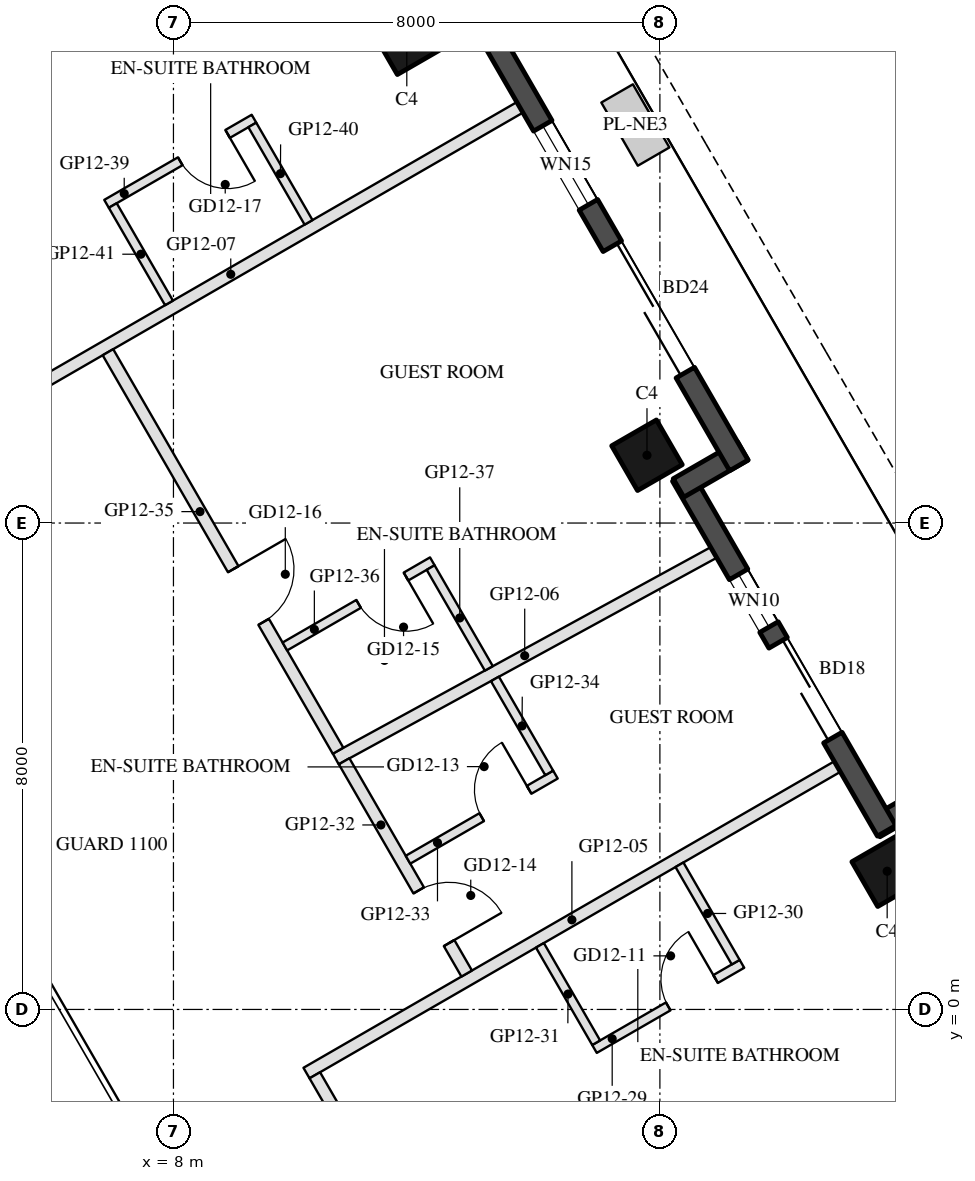
"""IFC4 building model, lengths in metres.
Left out: names, types, materials, properties, quantities, classifications, styles, units other than length and angle.
Written with IfcOpenShell. Run it as: python <this file> out.ifc"""

import sys

from ifc_helpers import new_model, si_unit, direction, frame, frame_2d, origin, origin_2d, place, context, subcontext, project, spatial, rectangle, hollow_rectangle, extrude, element, fill, save


model = new_model("IFC4")
c1 = context("Model", 3, precision=1e-05, world=origin(), true_north=direction((0.0, 1.0)))
c2 = subcontext(c1, "Body", "Model", "MODEL_VIEW")
j1 = project(units=[si_unit("LENGTHUNIT", "METRE"), si_unit("PLANEANGLEUNIT", "RADIAN")], contexts=[c1])
p1 = place(None, origin())
s1 = spatial("IfcSite", under=j1, at=p1, CompositionType="ELEMENT")
p2 = place(p1, origin())
s2 = spatial("IfcBuilding", under=s1, at=p2, CompositionType="ELEMENT")
p3 = place(p2, frame((0.0, 0.0, 146.6)))
s3 = spatial("IfcBuildingStorey", under=s2, at=p3, CompositionType="ELEMENT", Elevation=146.6)
for number, where, z_axis, x_axis in (
    (1, (19.738, 2.273, 0.0), (0.0, 0.0, 1.0), (-0.5, 0.866, 0.0)),
    (2, (15.788, 9.115, 0.0), (0.0, 0.0, 1.0), (-0.5, 0.866, 0.0)),
    (3, (11.838, 15.957, 0.0), (0.0, 0.0, 1.0), (-0.5, 0.866, 0.0)),
):
    element("IfcColumn", number, at=place(p3, frame(where, z_axis=z_axis, x_axis=x_axis)), inside=s3, PredefinedType="COLUMN", context=c2, shape_type="SweptSolid", body=[
        extrude(hollow_rectangle(XDim=0.85, YDim=0.85, WallThickness=0.04, at=origin_2d()), origin(), (0.0, 0.0, 1.0), 3.7),
    ])
p4 = place(p3, frame((20.588, 3.601, 0.0), z_axis=(0.0, 0.0, 1.0), x_axis=(-0.866005645448, -0.500034220881, 0.0)))
e4 = element("IfcWall", 4, at=p4, inside=s3, PredefinedType="SOLIDWALL", context=c2, shape_type="SweptSolid", body=[
    extrude(rectangle(XDim=1.22, YDim=0.35, at=frame_2d((0.61, 0.0))), origin(), (0.0, 0.0, 1.0), 3.55),
])
p5 = place(p3, frame((19.729, 2.938, 0.0), z_axis=(0.0, 0.0, 1.0), x_axis=(-0.499976430342, 0.866039011305, 0.0)))
e5 = element("IfcWall", 5, at=p5, inside=s3, PredefinedType="SOLIDWALL", context=c2, shape_type="SweptSolid", body=[
    extrude(rectangle(XDim=6.74, YDim=0.35, at=frame_2d((3.37, 0.0))), origin(), (0.0, 0.0, 1.0), 3.55),
])
p6 = place(p5, frame((1.77, 0.0, 0.0)))
e6 = element("IfcOpeningElement", 6, at=p6, cuts=e5, PredefinedType="OPENING", context=c2, shape_type="SweptSolid", body=[
    extrude(rectangle(XDim=1.8, YDim=2.4, at=frame_2d((0.9, 1.2))), frame((0.0, 0.185, 0.0), z_axis=(0.0, -1.0, 0.0), x_axis=(1.0, 0.0, 0.0)), (0.0, 0.0, 1.0), 0.37),
])
p7 = place(p5, frame((3.87, 0.0, 0.3)))
e7 = element("IfcOpeningElement", 7, at=p7, cuts=e5, PredefinedType="OPENING", context=c2, shape_type="SweptSolid", body=[
    extrude(rectangle(XDim=1.0, YDim=2.65, at=frame_2d((0.5, 1.325))), frame((0.0, 0.185, 0.0), z_axis=(0.0, -1.0, 0.0), x_axis=(1.0, 0.0, 0.0)), (0.0, 0.0, 1.0), 0.37),
])
p8 = place(p3, frame((16.306, 8.577, 0.0), z_axis=(0.0, 0.0, 1.0), x_axis=(0.866092288191, 0.499884134912, 0.0)))
e8 = element("IfcWall", 8, at=p8, inside=s3, PredefinedType="SOLIDWALL", context=c2, shape_type="SweptSolid", body=[
    extrude(rectangle(XDim=1.22, YDim=0.35, at=frame_2d((0.61, 0.0))), origin(), (0.0, 0.0, 1.0), 3.55),
])
p9 = place(p3, frame((17.299, 8.948, 0.0), z_axis=(0.0, 0.0, 1.0), x_axis=(-0.500010041276, 0.866019606374, 0.0)))
e9 = element("IfcWall", 9, at=p9, inside=s3, PredefinedType="SOLIDWALL", context=c2, shape_type="SweptSolid", body=[
    extrude(rectangle(XDim=9.7, YDim=0.35, at=frame_2d((4.85, 0.0))), origin(), (0.0, 0.0, 1.0), 3.55),
])
p10 = place(p9, frame((1.762, 0.0, 0.0)))
e10 = element("IfcOpeningElement", 10, at=p10, cuts=e9, PredefinedType="OPENING", context=c2, shape_type="SweptSolid", body=[
    extrude(rectangle(XDim=2.4, YDim=2.4, at=frame_2d((1.2, 1.2))), frame((0.0, 0.185, 0.0), z_axis=(0.0, -1.0, 0.0), x_axis=(1.0, 0.0, 0.0)), (0.0, 0.0, 1.0), 0.37),
])
p11 = place(p9, frame((4.949, 0.0, 0.3)))
e11 = element("IfcOpeningElement", 11, at=p11, cuts=e9, PredefinedType="OPENING", context=c2, shape_type="SweptSolid", body=[
    extrude(rectangle(XDim=1.5, YDim=2.65, at=frame_2d((0.75, 1.325))), frame((0.0, 0.185, 0.0), z_axis=(0.0, -1.0, 0.0), x_axis=(1.0, 0.0, 0.0)), (0.0, 0.0, 1.0), 0.37),
])
p12 = place(p3, frame((18.917, 3.994, 0.0), z_axis=(0.0, 0.0, 1.0), x_axis=(-0.866022637375, -0.500004791531, 0.0)))
e12 = element("IfcWall", 12, at=p12, inside=s3, PredefinedType="PARTITIONING", context=c2, shape_type="SweptSolid", body=[
    extrude(rectangle(XDim=10.08, YDim=0.2, at=frame_2d((5.04, 0.0))), origin(), (0.0, 0.0, 1.0), 3.06),
])
p13 = place(p3, frame((16.885, 7.515, 0.0), z_axis=(0.0, 0.0, 1.0), x_axis=(-0.87760821498, -0.479378577952, 0.0)))
e13 = element("IfcWall", 13, at=p13, inside=s3, PredefinedType="PARTITIONING", context=c2, shape_type="SweptSolid", body=[
    extrude(rectangle(XDim=7.082, YDim=0.2, at=frame_2d((3.541, 0.0))), origin(), (0.0, 0.0, 1.0), 3.06),
])
p14 = place(p3, frame((13.697, 14.836, 0.0), z_axis=(0.0, 0.0, 1.0), x_axis=(-0.866027479907, -0.499996404033, 0.0)))
e14 = element("IfcWall", 14, at=p14, inside=s3, PredefinedType="PARTITIONING", context=c2, shape_type="SweptSolid", body=[
    extrude(rectangle(XDim=10.98, YDim=0.2, at=frame_2d((5.49, 0.0))), origin(), (0.0, 0.0, 1.0), 3.06),
])
p15 = place(p3, frame((10.325, -1.083, 0.0), z_axis=(0.0, 0.0, 1.0), x_axis=(0.500008716408, -0.866020371305, 0.0)))
e15 = element("IfcWall", 15, at=p15, inside=s3, PredefinedType="PARTITIONING", context=c2, shape_type="SweptSolid", body=[
    extrude(rectangle(XDim=3.888, YDim=0.2, at=frame_2d((1.944, 0.0))), origin(), (0.0, 0.0, 1.0), 2.95),
])
p16 = place(p15, frame((1.444, 0.0, 0.0)))
e16 = element("IfcOpeningElement", 16, at=p16, cuts=e15, PredefinedType="OPENING", context=c2, shape_type="SweptSolid", body=[
    extrude(rectangle(XDim=1.0, YDim=2.1, at=frame_2d((0.5, 1.05))), frame((0.0, 0.11, 0.0), z_axis=(0.0, -1.0, 0.0), x_axis=(1.0, 0.0, 0.0)), (0.0, 0.0, 1.0), 0.22),
])
p17 = place(p3, frame((14.924, -0.65, 0.0), z_axis=(0.0, 0.0, 1.0), x_axis=(0.866056369097, 0.49994636267, 0.0)))
e17 = element("IfcWall", 17, at=p17, inside=s3, PredefinedType="PARTITIONING", context=c2, shape_type="SweptSolid", body=[
    extrude(rectangle(XDim=2.8, YDim=0.15, at=frame_2d((1.4, 0.0))), origin(), (0.0, 0.0, 1.0), 2.95),
])
p18 = place(p17, frame((1.4, 0.0, 0.0)))
e18 = element("IfcOpeningElement", 18, at=p18, cuts=e17, PredefinedType="OPENING", context=c2, shape_type="SweptSolid", body=[
    extrude(rectangle(XDim=0.9, YDim=2.1, at=frame_2d((0.45, 1.05))), frame((0.0, 0.085, 0.0), z_axis=(0.0, -1.0, 0.0), x_axis=(1.0, 0.0, 0.0)), (0.0, 0.0, 1.0), 0.17),
])
for number, where, z_axis, x_axis in (
    (19, (17.247, 0.778, 0.0), (0.0, 0.0, 1.0), (-0.5, 0.866, 0.0)),
    (20, (14.952, -0.547, 0.0), (0.0, 0.0, 1.0), (-0.5, 0.866, 0.0)),
):
    element("IfcWall", number, at=place(p3, frame(where, z_axis=z_axis, x_axis=x_axis)), inside=s3, PredefinedType="PARTITIONING", context=c2, shape_type="SweptSolid", body=[
        extrude(rectangle(XDim=1.85, YDim=0.15, at=frame_2d((0.925, 0.0))), origin(), (0.0, 0.0, 1.0), 2.95),
    ])
p19 = place(p3, frame((10.807, 4.082, 0.0), z_axis=(0.0, 0.0, 1.0), x_axis=(0.500040475235, -0.866002034136, 0.0)))
e21 = element("IfcWall", 21, at=p19, inside=s3, PredefinedType="PARTITIONING", context=c2, shape_type="SweptSolid", body=[
    extrude(rectangle(XDim=4.031, YDim=0.2, at=frame_2d((2.016, 0.0))), origin(), (0.0, 0.0, 1.0), 2.95),
])
p20 = place(p19, frame((2.452, 0.0, 0.0)))
e22 = element("IfcOpeningElement", 22, at=p20, cuts=e21, PredefinedType="OPENING", context=c2, shape_type="SweptSolid", body=[
    extrude(rectangle(XDim=1.0, YDim=2.1, at=frame_2d((0.5, 1.05))), frame((0.0, 0.11, 0.0), z_axis=(0.0, -1.0, 0.0), x_axis=(1.0, 0.0, 0.0)), (0.0, 0.0, 1.0), 0.22),
])
p21 = place(p3, frame((11.857, 2.463, 0.0), z_axis=(0.0, 0.0, 1.0), x_axis=(0.866034573852, 0.49998411664, 0.0)))
e23 = element("IfcWall", 23, at=p21, inside=s3, PredefinedType="PARTITIONING", context=c2, shape_type="SweptSolid", body=[
    extrude(rectangle(XDim=2.8, YDim=0.15, at=frame_2d((1.4, 0.0))), origin(), (0.0, 0.0, 1.0), 2.95),
])
p22 = place(p21, frame((1.4, 0.0, 0.0)))
e24 = element("IfcOpeningElement", 24, at=p22, cuts=e23, PredefinedType="OPENING", context=c2, shape_type="SweptSolid", body=[
    extrude(rectangle(XDim=0.9, YDim=2.1, at=frame_2d((0.45, 1.05))), frame((0.0, 0.085, 0.0), z_axis=(0.0, -1.0, 0.0), x_axis=(1.0, 0.0, 0.0)), (0.0, 0.0, 1.0), 0.17),
])
p23 = place(p3, frame((14.18, 3.89, 0.0), z_axis=(0.0, 0.0, 1.0), x_axis=(-0.500006500783, 0.866021650523, 0.0)))
e25 = element("IfcWall", 25, at=p23, inside=s3, PredefinedType="PARTITIONING", context=c2, shape_type="SweptSolid", body=[
    extrude(rectangle(XDim=1.786, YDim=0.15, at=frame_2d((0.893, 0.0))), origin(), (0.0, 0.0, 1.0), 3.55),
])
p24 = place(p3, frame((6.923, 10.81, 0.0), z_axis=(0.0, 0.0, 1.0), x_axis=(0.500007257026, -0.866021213898, 0.0)))
e26 = element("IfcWall", 26, at=p24, inside=s3, PredefinedType="PARTITIONING", context=c2, shape_type="SweptSolid", body=[
    extrude(rectangle(XDim=7.569, YDim=0.2, at=frame_2d((3.784, 0.0))), origin(), (0.0, 0.0, 1.0), 2.95),
])
p25 = place(p24, frame((4.121, 0.0, 0.0)))
e27 = element("IfcOpeningElement", 27, at=p25, cuts=e26, PredefinedType="OPENING", context=c2, shape_type="SweptSolid", body=[
    extrude(rectangle(XDim=1.0, YDim=2.1, at=frame_2d((0.5, 1.05))), frame((0.0, 0.11, 0.0), z_axis=(0.0, -1.0, 0.0), x_axis=(1.0, 0.0, 0.0)), (0.0, 0.0, 1.0), 0.22),
])
p26 = place(p3, frame((12.257, 7.37, 0.0), z_axis=(0.0, 0.0, 1.0), x_axis=(-0.865996816683, -0.500049511043, 0.0)))
e28 = element("IfcWall", 28, at=p26, inside=s3, PredefinedType="PARTITIONING", context=c2, shape_type="SweptSolid", body=[
    extrude(rectangle(XDim=2.8, YDim=0.15, at=frame_2d((1.4, 0.0))), origin(), (0.0, 0.0, 1.0), 3.55),
])
p27 = place(p26, frame((0.5, 0.0, 0.0)))
e29 = element("IfcOpeningElement", 29, at=p27, cuts=e28, PredefinedType="OPENING", context=c2, shape_type="SweptSolid", body=[
    extrude(rectangle(XDim=0.9, YDim=2.1, at=frame_2d((0.45, 1.05))), frame((0.0, 0.085, 0.0), z_axis=(0.0, -1.0, 0.0), x_axis=(1.0, 0.0, 0.0)), (0.0, 0.0, 1.0), 0.17),
])
p28 = place(p3, frame((13.187, 5.61, 0.0), z_axis=(0.0, 0.0, 1.0), x_axis=(-0.500020498207, 0.866013568815, 0.0)))
e30 = element("IfcWall", 30, at=p28, inside=s3, PredefinedType="PARTITIONING", context=c2, shape_type="SweptSolid", body=[
    extrude(rectangle(XDim=1.915, YDim=0.15, at=frame_2d((0.957, 0.0))), origin(), (0.0, 0.0, 1.0), 2.95),
])
p29 = place(p3, frame((9.324, 14.65, 0.0), z_axis=(0.0, 0.0, 1.0), x_axis=(-0.866034573852, -0.49998411664, 0.0)))
e31 = element("IfcWall", 31, at=p29, inside=s3, PredefinedType="PARTITIONING", context=c2, shape_type="SweptSolid", body=[
    extrude(rectangle(XDim=2.8, YDim=0.15, at=frame_2d((1.4, 0.0))), origin(), (0.0, 0.0, 1.0), 2.95),
])
p30 = place(p29, frame((0.5, 0.0, 0.0)))
e32 = element("IfcOpeningElement", 32, at=p30, cuts=e31, PredefinedType="OPENING", context=c2, shape_type="SweptSolid", body=[
    extrude(rectangle(XDim=0.9, YDim=2.1, at=frame_2d((0.45, 1.05))), frame((0.0, 0.085, 0.0), z_axis=(0.0, -1.0, 0.0), x_axis=(1.0, 0.0, 0.0)), (0.0, 0.0, 1.0), 0.17),
])
for number, where, z_axis, x_axis in (
    (33, (10.222, 12.945, 0.0), (0.0, 0.0, 1.0), (-0.5, 0.866, 0.0)),
    (34, (7.927, 11.62, 0.0), (0.0, 0.0, 1.0), (-0.5, 0.866, 0.0)),
):
    element("IfcWall", number, at=place(p3, frame(where, z_axis=z_axis, x_axis=x_axis)), inside=s3, PredefinedType="PARTITIONING", context=c2, shape_type="SweptSolid", body=[
        extrude(rectangle(XDim=1.85, YDim=0.15, at=frame_2d((0.925, 0.0))), origin(), (0.0, 0.0, 1.0), 2.95),
    ])
p31 = place(p6, frame((1.8, 0.0, 0.0), z_axis=(0.0, 0.0, 1.0), x_axis=(-1.0, 0.0, 0.0)))
e35 = element("IfcDoor", 35, at=p31, inside=s3, OperationType="SLIDING_TO_LEFT", PredefinedType="DOOR", context=c2, shape_type="SweptSolid", body=[
    extrude(rectangle(XDim=1.8, YDim=2.4, at=frame_2d((0.9, 1.2))), frame((0.0, 0.025, 0.0), z_axis=(0.0, -1.0, 0.0), x_axis=(1.0, 0.0, 0.0)), (0.0, 0.0, 1.0), 0.05),
])
fill(e6, e35)
p32 = place(p7, origin())
e36 = element("IfcWindow", 36, at=p32, inside=s3, PartitioningType="SINGLE_PANEL", PredefinedType="WINDOW", context=c2, shape_type="SweptSolid", body=[
    extrude(rectangle(XDim=1.0, YDim=2.65, at=frame_2d((0.5, 1.325))), frame((0.0, 0.03, 0.0), z_axis=(0.0, -1.0, 0.0), x_axis=(1.0, 0.0, 0.0)), (0.0, 0.0, 1.0), 0.06),
])
fill(e7, e36)
p33 = place(p10, frame((2.4, 0.0, 0.0), z_axis=(0.0, 0.0, 1.0), x_axis=(-1.0, 0.0, 0.0)))
e37 = element("IfcDoor", 37, at=p33, inside=s3, OperationType="SLIDING_TO_LEFT", PredefinedType="DOOR", context=c2, shape_type="SweptSolid", body=[
    extrude(rectangle(XDim=2.4, YDim=2.4, at=frame_2d((1.2, 1.2))), frame((0.0, 0.025, 0.0), z_axis=(0.0, -1.0, 0.0), x_axis=(1.0, 0.0, 0.0)), (0.0, 0.0, 1.0), 0.05),
])
fill(e10, e37)
p34 = place(p11, origin())
e38 = element("IfcWindow", 38, at=p34, inside=s3, PartitioningType="SINGLE_PANEL", PredefinedType="WINDOW", context=c2, shape_type="SweptSolid", body=[
    extrude(rectangle(XDim=1.5, YDim=2.65, at=frame_2d((0.75, 1.325))), frame((0.0, 0.03, 0.0), z_axis=(0.0, -1.0, 0.0), x_axis=(1.0, 0.0, 0.0)), (0.0, 0.0, 1.0), 0.06),
])
fill(e11, e38)
p35 = place(p18, origin())
e39 = element("IfcDoor", 39, at=p35, inside=s3, OperationType="SINGLE_SWING_RIGHT", PredefinedType="DOOR", context=c2, shape_type="SweptSolid", body=[
    extrude(rectangle(XDim=0.9, YDim=2.1, at=frame_2d((0.45, 1.05))), frame((0.0, 0.025, 0.0), z_axis=(0.0, -1.0, 0.0), x_axis=(1.0, 0.0, 0.0)), (0.0, 0.0, 1.0), 0.05),
])
fill(e18, e39)
p36 = place(p22, origin())
e40 = element("IfcDoor", 40, at=p36, inside=s3, OperationType="SINGLE_SWING_RIGHT", PredefinedType="DOOR", context=c2, shape_type="SweptSolid", body=[
    extrude(rectangle(XDim=0.9, YDim=2.1, at=frame_2d((0.45, 1.05))), frame((0.0, 0.025, 0.0), z_axis=(0.0, -1.0, 0.0), x_axis=(1.0, 0.0, 0.0)), (0.0, 0.0, 1.0), 0.05),
])
fill(e24, e40)
p37 = place(p20, origin())
e41 = element("IfcDoor", 41, at=p37, inside=s3, OperationType="SINGLE_SWING_RIGHT", PredefinedType="DOOR", context=c2, shape_type="SweptSolid", body=[
    extrude(rectangle(XDim=1.0, YDim=2.1, at=frame_2d((0.5, 1.05))), frame((0.0, 0.025, 0.0), z_axis=(0.0, -1.0, 0.0), x_axis=(1.0, 0.0, 0.0)), (0.0, 0.0, 1.0), 0.05),
])
fill(e22, e41)
p38 = place(p27, origin())
e42 = element("IfcDoor", 42, at=p38, inside=s3, OperationType="SINGLE_SWING_LEFT", PredefinedType="DOOR", context=c2, shape_type="SweptSolid", body=[
    extrude(rectangle(XDim=0.9, YDim=2.1, at=frame_2d((0.45, 1.05))), frame((0.0, 0.025, 0.0), z_axis=(0.0, -1.0, 0.0), x_axis=(1.0, 0.0, 0.0)), (0.0, 0.0, 1.0), 0.05),
])
fill(e29, e42)
p39 = place(p25, origin())
e43 = element("IfcDoor", 43, at=p39, inside=s3, OperationType="SINGLE_SWING_LEFT", PredefinedType="DOOR", context=c2, shape_type="SweptSolid", body=[
    extrude(rectangle(XDim=1.0, YDim=2.1, at=frame_2d((0.5, 1.05))), frame((0.0, 0.025, 0.0), z_axis=(0.0, -1.0, 0.0), x_axis=(1.0, 0.0, 0.0)), (0.0, 0.0, 1.0), 0.05),
])
fill(e27, e43)
p40 = place(p30, origin())
e44 = element("IfcDoor", 44, at=p40, inside=s3, OperationType="SINGLE_SWING_LEFT", PredefinedType="DOOR", context=c2, shape_type="SweptSolid", body=[
    extrude(rectangle(XDim=0.9, YDim=2.1, at=frame_2d((0.45, 1.05))), frame((0.0, 0.025, 0.0), z_axis=(0.0, -1.0, 0.0), x_axis=(1.0, 0.0, 0.0)), (0.0, 0.0, 1.0), 0.05),
])
fill(e32, e44)
save(model, sys.argv[1])
